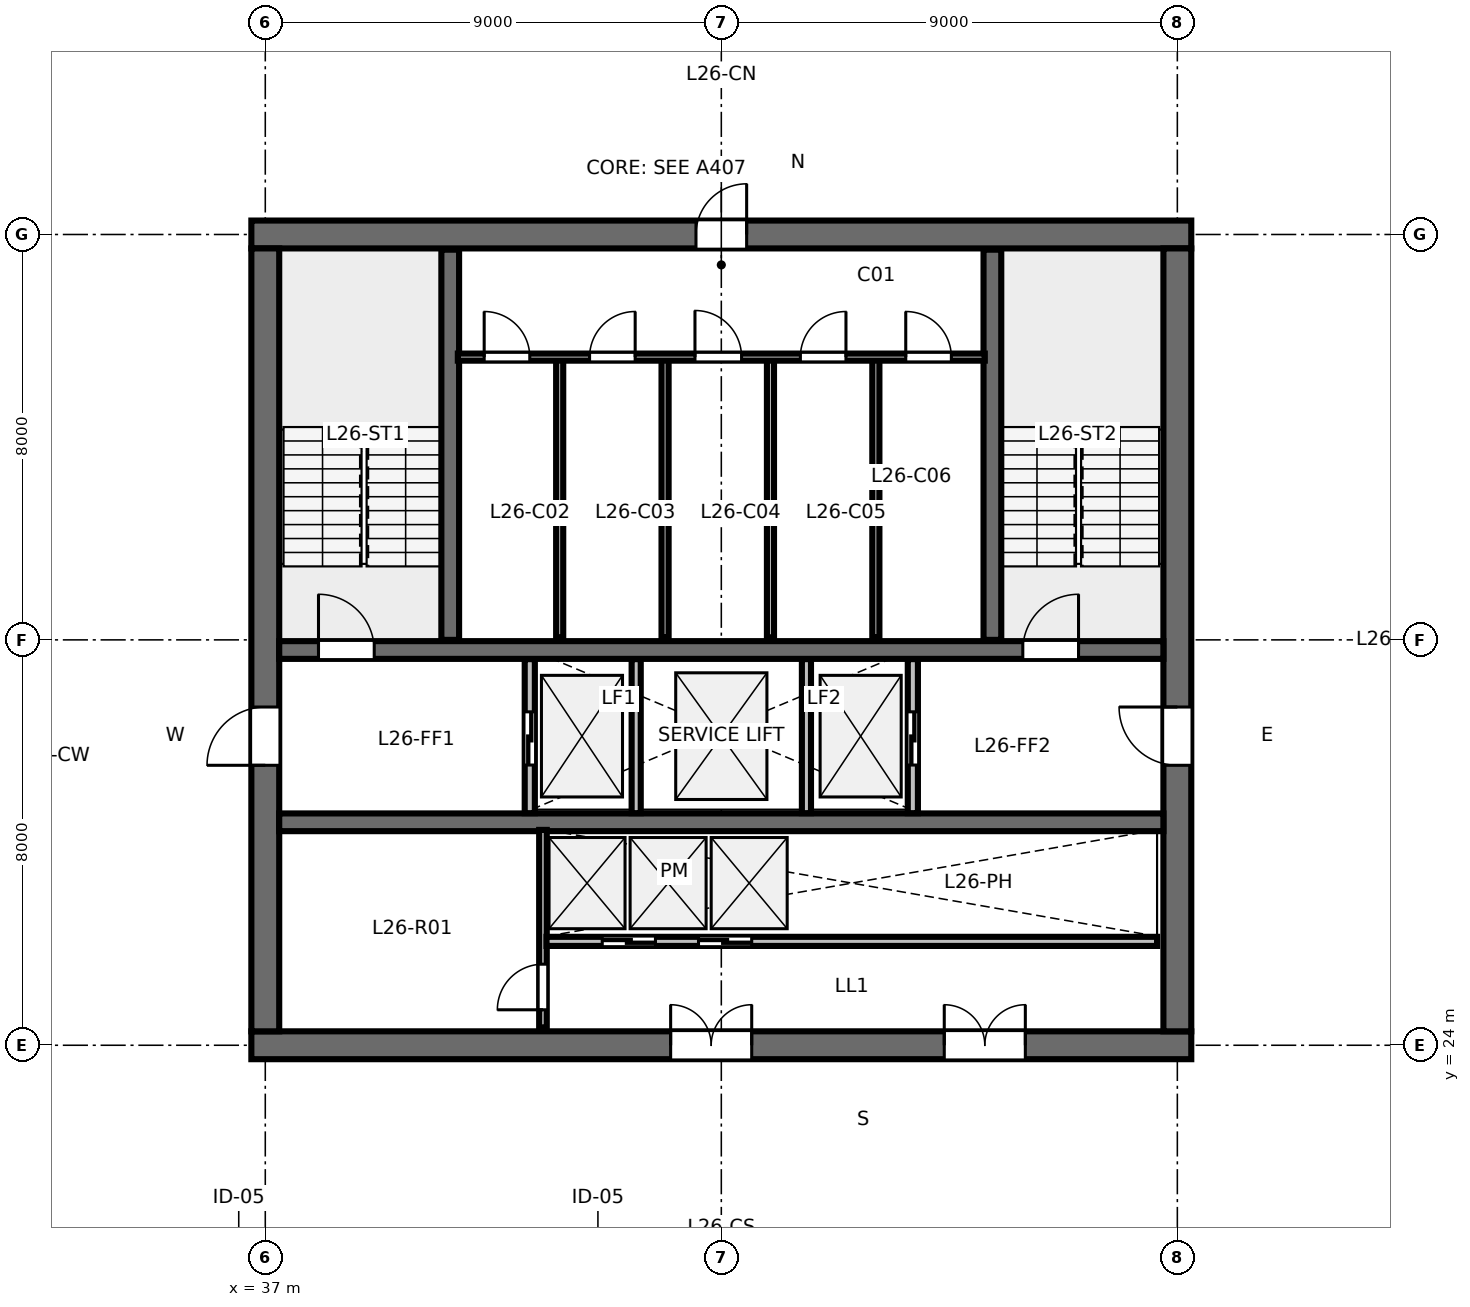
"""IFC4 building model, lengths in metres.
Left out: names, types, materials, properties, quantities, classifications, styles, units other than length and angle.
Written with IfcOpenShell. Run it as: python <this file> out.ifc"""

import sys

from ifc_helpers import new_model, si_unit, direction, frame, frame_2d, origin, place, context, subcontext, project, spatial, rectangle, extrude, element, fill, save


model = new_model("IFC4")
c1 = context("Model", 3, precision=1e-05, world=origin(), true_north=direction((0.0, 1.0)))
c2 = subcontext(c1, "Body", "Model", "MODEL_VIEW")
j1 = project(units=[si_unit("LENGTHUNIT", "METRE"), si_unit("PLANEANGLEUNIT", "RADIAN")], contexts=[c1])
p1 = place(None, origin())
s1 = spatial("IfcSite", under=j1, at=p1, CompositionType="ELEMENT")
p2 = place(p1, origin())
s2 = spatial("IfcBuilding", under=s1, at=p2, CompositionType="ELEMENT")
p3 = place(p2, frame((0.0, 0.0, 102.4)))
s3 = spatial("IfcBuildingStorey", under=s2, at=p3, CompositionType="ELEMENT", Elevation=102.4)
p4 = place(p3, frame((36.725, 24.0, 0.0), z_axis=(0.0, 0.0, 1.0), x_axis=(1.0, 0.0, 0.0)))
e1 = element("IfcWall", 1, at=p4, inside=s3, PredefinedType="SHEAR", context=c2, shape_type="SweptSolid", body=[
    extrude(rectangle(XDim=18.55, YDim=0.55, at=frame_2d((9.275, 0.0))), origin(), (0.0, 0.0, 1.0), 3.36),
])
p5 = place(p4, frame((8.275, 0.0, 0.0)))
e2 = element("IfcOpeningElement", 2, at=p5, cuts=e1, PredefinedType="OPENING", context=c2, shape_type="SweptSolid", body=[
    extrude(rectangle(XDim=1.6, YDim=2.15, at=frame_2d((0.8, 1.075))), frame((0.0, 0.285, 0.0), z_axis=(0.0, -1.0, 0.0), x_axis=(1.0, 0.0, 0.0)), (0.0, 0.0, 1.0), 0.57),
])
p6 = place(p4, frame((13.675, 0.0, 0.0)))
e3 = element("IfcOpeningElement", 3, at=p6, cuts=e1, PredefinedType="OPENING", context=c2, shape_type="SweptSolid", body=[
    extrude(rectangle(XDim=1.6, YDim=2.15, at=frame_2d((0.8, 1.075))), frame((0.0, 0.285, 0.0), z_axis=(0.0, -1.0, 0.0), x_axis=(1.0, 0.0, 0.0)), (0.0, 0.0, 1.0), 0.57),
])
p7 = place(p3, frame((36.725, 40.0, 0.0), z_axis=(0.0, 0.0, 1.0), x_axis=(1.0, 0.0, 0.0)))
e4 = element("IfcWall", 4, at=p7, inside=s3, PredefinedType="SHEAR", context=c2, shape_type="SweptSolid", body=[
    extrude(rectangle(XDim=18.55, YDim=0.55, at=frame_2d((9.275, 0.0))), origin(), (0.0, 0.0, 1.0), 3.36),
])
p8 = place(p7, frame((8.775, 0.0, 0.0)))
e5 = element("IfcOpeningElement", 5, at=p8, cuts=e4, PredefinedType="OPENING", context=c2, shape_type="SweptSolid", body=[
    extrude(rectangle(XDim=1.0, YDim=2.15, at=frame_2d((0.5, 1.075))), frame((0.0, 0.285, 0.0), z_axis=(0.0, -1.0, 0.0), x_axis=(1.0, 0.0, 0.0)), (0.0, 0.0, 1.0), 0.57),
])
p9 = place(p3, frame((37.0, 24.275, 0.0), z_axis=(0.0, 0.0, 1.0), x_axis=(0.0, 1.0, 0.0)))
e6 = element("IfcWall", 6, at=p9, inside=s3, PredefinedType="SHEAR", context=c2, shape_type="SweptSolid", body=[
    extrude(rectangle(XDim=15.45, YDim=0.55, at=frame_2d((7.725, 0.0))), origin(), (0.0, 0.0, 1.0), 3.36),
])
p10 = place(p9, frame((5.25, 0.0, 0.0)))
e7 = element("IfcOpeningElement", 7, at=p10, cuts=e6, PredefinedType="OPENING", context=c2, shape_type="SweptSolid", body=[
    extrude(rectangle(XDim=1.15, YDim=2.15, at=frame_2d((0.575, 1.075))), frame((0.0, 0.285, 0.0), z_axis=(0.0, -1.0, 0.0), x_axis=(1.0, 0.0, 0.0)), (0.0, 0.0, 1.0), 0.57),
])
p11 = place(p3, frame((55.0, 24.275, 0.0), z_axis=(0.0, 0.0, 1.0), x_axis=(0.0, 1.0, 0.0)))
e8 = element("IfcWall", 8, at=p11, inside=s3, PredefinedType="SHEAR", context=c2, shape_type="SweptSolid", body=[
    extrude(rectangle(XDim=15.45, YDim=0.55, at=frame_2d((7.725, 0.0))), origin(), (0.0, 0.0, 1.0), 3.36),
])
p12 = place(p11, frame((5.25, 0.0, 0.0)))
e9 = element("IfcOpeningElement", 9, at=p12, cuts=e8, PredefinedType="OPENING", context=c2, shape_type="SweptSolid", body=[
    extrude(rectangle(XDim=1.15, YDim=2.15, at=frame_2d((0.575, 1.075))), frame((0.0, 0.285, 0.0), z_axis=(0.0, -1.0, 0.0), x_axis=(1.0, 0.0, 0.0)), (0.0, 0.0, 1.0), 0.57),
])
p13 = place(p3, frame((37.275, 31.8, 0.0), z_axis=(0.0, 0.0, 1.0), x_axis=(1.0, 0.0, 0.0)))
e10 = element("IfcWall", 10, at=p13, inside=s3, PredefinedType="SHEAR", context=c2, shape_type="SweptSolid", body=[
    extrude(rectangle(XDim=17.45, YDim=0.35, at=frame_2d((8.725, 0.0))), origin(), (0.0, 0.0, 1.0), 3.36),
])
p14 = place(p13, frame((0.775, 0.0, 0.0)))
e11 = element("IfcOpeningElement", 11, at=p14, cuts=e10, PredefinedType="OPENING", context=c2, shape_type="SweptSolid", body=[
    extrude(rectangle(XDim=1.1, YDim=2.15, at=frame_2d((0.55, 1.075))), frame((0.0, 0.185, 0.0), z_axis=(0.0, -1.0, 0.0), x_axis=(1.0, 0.0, 0.0)), (0.0, 0.0, 1.0), 0.37),
])
p15 = place(p13, frame((14.675, 0.0, 0.0)))
e12 = element("IfcOpeningElement", 12, at=p15, cuts=e10, PredefinedType="OPENING", context=c2, shape_type="SweptSolid", body=[
    extrude(rectangle(XDim=1.1, YDim=2.15, at=frame_2d((0.55, 1.075))), frame((0.0, 0.185, 0.0), z_axis=(0.0, -1.0, 0.0), x_axis=(1.0, 0.0, 0.0)), (0.0, 0.0, 1.0), 0.37),
])
p16 = place(p3, frame((37.275, 28.4, 0.0), z_axis=(0.0, 0.0, 1.0), x_axis=(1.0, 0.0, 0.0)))
e13 = element("IfcWall", 13, at=p16, inside=s3, PredefinedType="SHEAR", context=c2, shape_type="SweptSolid", body=[
    extrude(rectangle(XDim=17.45, YDim=0.35, at=frame_2d((8.725, 0.0))), origin(), (0.0, 0.0, 1.0), 3.36),
])
for number, where, z_axis, x_axis in (
    (14, (40.65, 32.0, 0.0), (0.0, 0.0, 1.0), (0.0, 1.0, 0.0)),
    (15, (51.35, 32.0, 0.0), (0.0, 0.0, 1.0), (0.0, 1.0, 0.0)),
):
    element("IfcWall", number, at=place(p3, frame(where, z_axis=z_axis, x_axis=x_axis)), inside=s3, PredefinedType="SHEAR", context=c2, shape_type="SweptSolid", body=[
        extrude(rectangle(XDim=7.7, YDim=0.35, at=frame_2d((3.85, 0.0))), origin(), (0.0, 0.0, 1.0), 3.6),
    ])
for number, where, z_axis, x_axis in (
    (16, (42.81, 32.05, 0.0), (0.0, 0.0, 1.0), (0.0, 1.0, 0.0)),
    (17, (44.89, 32.05, 0.0), (0.0, 0.0, 1.0), (0.0, 1.0, 0.0)),
    (18, (46.97, 32.05, 0.0), (0.0, 0.0, 1.0), (0.0, 1.0, 0.0)),
    (19, (49.05, 32.05, 0.0), (0.0, 0.0, 1.0), (0.0, 1.0, 0.0)),
):
    element("IfcWall", number, at=place(p3, frame(where, z_axis=z_axis, x_axis=x_axis)), inside=s3, PredefinedType="PARTITIONING", context=c2, shape_type="SweptSolid", body=[
        extrude(rectangle(XDim=5.5, YDim=0.14, at=frame_2d((2.75, 0.0))), origin(), (0.0, 0.0, 1.0), 3.36),
    ])
p17 = place(p3, frame((40.8, 37.58, 0.0), z_axis=(0.0, 0.0, 1.0), x_axis=(1.0, 0.0, 0.0)))
e20 = element("IfcWall", 20, at=p17, inside=s3, PredefinedType="PARTITIONING", context=c2, shape_type="SweptSolid", body=[
    extrude(rectangle(XDim=10.4, YDim=0.14, at=frame_2d((5.2, 0.0))), origin(), (0.0, 0.0, 1.0), 3.36),
])
p18 = place(p17, frame((0.52, 0.0, 0.0)))
e21 = element("IfcOpeningElement", 21, at=p18, cuts=e20, PredefinedType="OPENING", context=c2, shape_type="SweptSolid", body=[
    extrude(rectangle(XDim=0.9, YDim=2.15, at=frame_2d((0.45, 1.075))), frame((0.0, 0.08, 0.0), z_axis=(0.0, -1.0, 0.0), x_axis=(1.0, 0.0, 0.0)), (0.0, 0.0, 1.0), 0.16),
])
p19 = place(p17, frame((2.6, 0.0, 0.0)))
e22 = element("IfcOpeningElement", 22, at=p19, cuts=e20, PredefinedType="OPENING", context=c2, shape_type="SweptSolid", body=[
    extrude(rectangle(XDim=0.9, YDim=2.15, at=frame_2d((0.45, 1.075))), frame((0.0, 0.08, 0.0), z_axis=(0.0, -1.0, 0.0), x_axis=(1.0, 0.0, 0.0)), (0.0, 0.0, 1.0), 0.16),
])
p20 = place(p17, frame((4.68, 0.0, 0.0)))
e23 = element("IfcOpeningElement", 23, at=p20, cuts=e20, PredefinedType="OPENING", context=c2, shape_type="SweptSolid", body=[
    extrude(rectangle(XDim=0.92, YDim=2.15, at=frame_2d((0.46, 1.075))), frame((0.0, 0.08, 0.0), z_axis=(0.0, -1.0, 0.0), x_axis=(1.0, 0.0, 0.0)), (0.0, 0.0, 1.0), 0.16),
])
p21 = place(p17, frame((6.76, 0.0, 0.0)))
e24 = element("IfcOpeningElement", 24, at=p21, cuts=e20, PredefinedType="OPENING", context=c2, shape_type="SweptSolid", body=[
    extrude(rectangle(XDim=0.9, YDim=2.15, at=frame_2d((0.45, 1.075))), frame((0.0, 0.08, 0.0), z_axis=(0.0, -1.0, 0.0), x_axis=(1.0, 0.0, 0.0)), (0.0, 0.0, 1.0), 0.16),
])
p22 = place(p17, frame((8.84, 0.0, 0.0)))
e25 = element("IfcOpeningElement", 25, at=p22, cuts=e20, PredefinedType="OPENING", context=c2, shape_type="SweptSolid", body=[
    extrude(rectangle(XDim=0.9, YDim=2.15, at=frame_2d((0.45, 1.075))), frame((0.0, 0.08, 0.0), z_axis=(0.0, -1.0, 0.0), x_axis=(1.0, 0.0, 0.0)), (0.0, 0.0, 1.0), 0.16),
])
p23 = place(p3, frame((42.22, 28.58, 0.0), z_axis=(0.0, 0.0, 1.0), x_axis=(0.0, 1.0, 0.0)))
e26 = element("IfcWall", 26, at=p23, inside=s3, PredefinedType="PARTITIONING", context=c2, shape_type="SweptSolid", body=[
    extrude(rectangle(XDim=3.04, YDim=0.2, at=frame_2d((1.52, 0.0))), origin(), (0.0, 0.0, 1.0), 3.36),
])
p24 = place(p23, frame((0.95, 0.0, 0.0)))
e27 = element("IfcOpeningElement", 27, at=p24, cuts=e26, PredefinedType="OPENING", context=c2, shape_type="SweptSolid", body=[
    extrude(rectangle(XDim=1.05, YDim=2.15, at=frame_2d((0.525, 1.075))), frame((0.0, 0.11, 0.0), z_axis=(0.0, -1.0, 0.0), x_axis=(1.0, 0.0, 0.0)), (0.0, 0.0, 1.0), 0.22),
])
p25 = place(p3, frame((49.78, 28.58, 0.0), z_axis=(0.0, 0.0, 1.0), x_axis=(0.0, 1.0, 0.0)))
e28 = element("IfcWall", 28, at=p25, inside=s3, PredefinedType="PARTITIONING", context=c2, shape_type="SweptSolid", body=[
    extrude(rectangle(XDim=3.04, YDim=0.2, at=frame_2d((1.52, 0.0))), origin(), (0.0, 0.0, 1.0), 3.36),
])
p26 = place(p25, frame((0.95, 0.0, 0.0)))
e29 = element("IfcOpeningElement", 29, at=p26, cuts=e28, PredefinedType="OPENING", context=c2, shape_type="SweptSolid", body=[
    extrude(rectangle(XDim=1.05, YDim=2.15, at=frame_2d((0.525, 1.075))), frame((0.0, 0.11, 0.0), z_axis=(0.0, -1.0, 0.0), x_axis=(1.0, 0.0, 0.0)), (0.0, 0.0, 1.0), 0.22),
])
for number, where, z_axis, x_axis in (
    (30, (44.32, 28.58, 0.0), (0.0, 0.0, 1.0), (0.0, 1.0, 0.0)),
    (31, (47.68, 28.58, 0.0), (0.0, 0.0, 1.0), (0.0, 1.0, 0.0)),
):
    element("IfcWall", number, at=place(p3, frame(where, z_axis=z_axis, x_axis=x_axis)), inside=s3, PredefinedType="PARTITIONING", context=c2, shape_type="SweptSolid", body=[
        extrude(rectangle(XDim=3.04, YDim=0.18, at=frame_2d((1.52, 0.0))), origin(), (0.0, 0.0, 1.0), 3.36),
    ])
p27 = place(p3, frame((42.48, 24.35, 0.0), z_axis=(0.0, 0.0, 1.0), x_axis=(0.0, 1.0, 0.0)))
e32 = element("IfcWall", 32, at=p27, inside=s3, PredefinedType="PARTITIONING", context=c2, shape_type="SweptSolid", body=[
    extrude(rectangle(XDim=3.9, YDim=0.15, at=frame_2d((1.95, 0.0))), origin(), (0.0, 0.0, 1.0), 3.36),
])
p28 = place(p27, frame((0.35, 0.0, 0.0)))
e33 = element("IfcOpeningElement", 33, at=p28, cuts=e32, PredefinedType="OPENING", context=c2, shape_type="SweptSolid", body=[
    extrude(rectangle(XDim=0.9, YDim=2.15, at=frame_2d((0.45, 1.075))), frame((0.0, 0.085, 0.0), z_axis=(0.0, -1.0, 0.0), x_axis=(1.0, 0.0, 0.0)), (0.0, 0.0, 1.0), 0.17),
])
p29 = place(p3, frame((42.55, 26.05, 0.0), z_axis=(0.0, 0.0, 1.0), x_axis=(1.0, 0.0, 0.0)))
e34 = element("IfcWall", 34, at=p29, inside=s3, PredefinedType="PARTITIONING", context=c2, shape_type="SweptSolid", body=[
    extrude(rectangle(XDim=12.05, YDim=0.18, at=frame_2d((6.025, 0.0))), origin(), (0.0, 0.0, 1.0), 3.36),
])
p30 = place(p29, frame((1.1, 0.0, 0.0)))
e35 = element("IfcOpeningElement", 35, at=p30, cuts=e34, PredefinedType="OPENING", context=c2, shape_type="SweptSolid", body=[
    extrude(rectangle(XDim=1.05, YDim=2.15, at=frame_2d((0.525, 1.075))), frame((0.0, 0.1, 0.0), z_axis=(0.0, -1.0, 0.0), x_axis=(1.0, 0.0, 0.0)), (0.0, 0.0, 1.0), 0.2),
])
p31 = place(p29, frame((3.0, 0.0, 0.0)))
e36 = element("IfcOpeningElement", 36, at=p31, cuts=e34, PredefinedType="OPENING", context=c2, shape_type="SweptSolid", body=[
    extrude(rectangle(XDim=1.05, YDim=2.15, at=frame_2d((0.525, 1.075))), frame((0.0, 0.1, 0.0), z_axis=(0.0, -1.0, 0.0), x_axis=(1.0, 0.0, 0.0)), (0.0, 0.0, 1.0), 0.2),
])
p32 = place(p14, origin())
e37 = element("IfcDoor", 37, at=p32, inside=s3, OperationType="SINGLE_SWING_LEFT", PredefinedType="DOOR", context=c2, shape_type="SweptSolid", body=[
    extrude(rectangle(XDim=1.1, YDim=2.15, at=frame_2d((0.55, 1.075))), frame((0.0, 0.025, 0.0), z_axis=(0.0, -1.0, 0.0), x_axis=(1.0, 0.0, 0.0)), (0.0, 0.0, 1.0), 0.05),
])
fill(e11, e37)
p33 = place(p15, origin())
e38 = element("IfcDoor", 38, at=p33, inside=s3, OperationType="SINGLE_SWING_RIGHT", PredefinedType="DOOR", context=c2, shape_type="SweptSolid", body=[
    extrude(rectangle(XDim=1.1, YDim=2.15, at=frame_2d((0.55, 1.075))), frame((0.0, 0.025, 0.0), z_axis=(0.0, -1.0, 0.0), x_axis=(1.0, 0.0, 0.0)), (0.0, 0.0, 1.0), 0.05),
])
fill(e12, e38)
p34 = place(p8, origin())
e39 = element("IfcDoor", 39, at=p34, inside=s3, OperationType="SINGLE_SWING_RIGHT", PredefinedType="DOOR", context=c2, shape_type="SweptSolid", body=[
    extrude(rectangle(XDim=1.0, YDim=2.15, at=frame_2d((0.5, 1.075))), frame((0.0, 0.025, 0.0), z_axis=(0.0, -1.0, 0.0), x_axis=(1.0, 0.0, 0.0)), (0.0, 0.0, 1.0), 0.05),
])
fill(e5, e39)
p35 = place(p10, origin())
e40 = element("IfcDoor", 40, at=p35, inside=s3, OperationType="SINGLE_SWING_LEFT", PredefinedType="DOOR", context=c2, shape_type="SweptSolid", body=[
    extrude(rectangle(XDim=1.15, YDim=2.15, at=frame_2d((0.575, 1.075))), frame((0.0, 0.025, 0.0), z_axis=(0.0, -1.0, 0.0), x_axis=(1.0, 0.0, 0.0)), (0.0, 0.0, 1.0), 0.05),
])
fill(e7, e40)
p36 = place(p12, origin())
e41 = element("IfcDoor", 41, at=p36, inside=s3, OperationType="SINGLE_SWING_RIGHT", PredefinedType="DOOR", context=c2, shape_type="SweptSolid", body=[
    extrude(rectangle(XDim=1.15, YDim=2.15, at=frame_2d((0.575, 1.075))), frame((0.0, 0.025, 0.0), z_axis=(0.0, -1.0, 0.0), x_axis=(1.0, 0.0, 0.0)), (0.0, 0.0, 1.0), 0.05),
])
fill(e9, e41)
p37 = place(p5, origin())
e42 = element("IfcDoor", 42, at=p37, inside=s3, OperationType="DOUBLE_DOOR_SINGLE_SWING", PredefinedType="DOOR", context=c2, shape_type="SweptSolid", body=[
    extrude(rectangle(XDim=1.6, YDim=2.15, at=frame_2d((0.8, 1.075))), frame((0.0, 0.025, 0.0), z_axis=(0.0, -1.0, 0.0), x_axis=(1.0, 0.0, 0.0)), (0.0, 0.0, 1.0), 0.05),
])
fill(e2, e42)
p38 = place(p6, origin())
e43 = element("IfcDoor", 43, at=p38, inside=s3, OperationType="DOUBLE_DOOR_SINGLE_SWING", PredefinedType="DOOR", context=c2, shape_type="SweptSolid", body=[
    extrude(rectangle(XDim=1.6, YDim=2.15, at=frame_2d((0.8, 1.075))), frame((0.0, 0.025, 0.0), z_axis=(0.0, -1.0, 0.0), x_axis=(1.0, 0.0, 0.0)), (0.0, 0.0, 1.0), 0.05),
])
fill(e3, e43)
p39 = place(p18, origin())
e44 = element("IfcDoor", 44, at=p39, inside=s3, OperationType="SINGLE_SWING_LEFT", PredefinedType="DOOR", context=c2, shape_type="SweptSolid", body=[
    extrude(rectangle(XDim=0.9, YDim=2.15, at=frame_2d((0.45, 1.075))), frame((0.0, 0.025, 0.0), z_axis=(0.0, -1.0, 0.0), x_axis=(1.0, 0.0, 0.0)), (0.0, 0.0, 1.0), 0.05),
])
fill(e21, e44)
p40 = place(p19, origin())
e45 = element("IfcDoor", 45, at=p40, inside=s3, OperationType="SINGLE_SWING_RIGHT", PredefinedType="DOOR", context=c2, shape_type="SweptSolid", body=[
    extrude(rectangle(XDim=0.9, YDim=2.15, at=frame_2d((0.45, 1.075))), frame((0.0, 0.025, 0.0), z_axis=(0.0, -1.0, 0.0), x_axis=(1.0, 0.0, 0.0)), (0.0, 0.0, 1.0), 0.05),
])
fill(e22, e45)
p41 = place(p20, origin())
e46 = element("IfcDoor", 46, at=p41, inside=s3, OperationType="SINGLE_SWING_LEFT", PredefinedType="DOOR", context=c2, shape_type="SweptSolid", body=[
    extrude(rectangle(XDim=0.92, YDim=2.15, at=frame_2d((0.46, 1.075))), frame((0.0, 0.025, 0.0), z_axis=(0.0, -1.0, 0.0), x_axis=(1.0, 0.0, 0.0)), (0.0, 0.0, 1.0), 0.05),
])
fill(e23, e46)
p42 = place(p21, origin())
e47 = element("IfcDoor", 47, at=p42, inside=s3, OperationType="SINGLE_SWING_RIGHT", PredefinedType="DOOR", context=c2, shape_type="SweptSolid", body=[
    extrude(rectangle(XDim=0.9, YDim=2.15, at=frame_2d((0.45, 1.075))), frame((0.0, 0.025, 0.0), z_axis=(0.0, -1.0, 0.0), x_axis=(1.0, 0.0, 0.0)), (0.0, 0.0, 1.0), 0.05),
])
fill(e24, e47)
p43 = place(p22, origin())
e48 = element("IfcDoor", 48, at=p43, inside=s3, OperationType="SINGLE_SWING_LEFT", PredefinedType="DOOR", context=c2, shape_type="SweptSolid", body=[
    extrude(rectangle(XDim=0.9, YDim=2.15, at=frame_2d((0.45, 1.075))), frame((0.0, 0.025, 0.0), z_axis=(0.0, -1.0, 0.0), x_axis=(1.0, 0.0, 0.0)), (0.0, 0.0, 1.0), 0.05),
])
fill(e25, e48)
p44 = place(p24, origin())
e49 = element("IfcDoor", 49, at=p44, inside=s3, OperationType="SLIDING_TO_LEFT", PredefinedType="DOOR", context=c2, shape_type="SweptSolid", body=[
    extrude(rectangle(XDim=1.05, YDim=2.15, at=frame_2d((0.525, 1.075))), frame((0.0, 0.025, 0.0), z_axis=(0.0, -1.0, 0.0), x_axis=(1.0, 0.0, 0.0)), (0.0, 0.0, 1.0), 0.05),
])
fill(e27, e49)
p45 = place(p26, origin())
e50 = element("IfcDoor", 50, at=p45, inside=s3, OperationType="SLIDING_TO_RIGHT", PredefinedType="DOOR", context=c2, shape_type="SweptSolid", body=[
    extrude(rectangle(XDim=1.05, YDim=2.15, at=frame_2d((0.525, 1.075))), frame((0.0, 0.025, 0.0), z_axis=(0.0, -1.0, 0.0), x_axis=(1.0, 0.0, 0.0)), (0.0, 0.0, 1.0), 0.05),
])
fill(e29, e50)
p46 = place(p28, origin())
e51 = element("IfcDoor", 51, at=p46, inside=s3, OperationType="SINGLE_SWING_LEFT", PredefinedType="DOOR", context=c2, shape_type="SweptSolid", body=[
    extrude(rectangle(XDim=0.9, YDim=2.15, at=frame_2d((0.45, 1.075))), frame((0.0, 0.025, 0.0), z_axis=(0.0, -1.0, 0.0), x_axis=(1.0, 0.0, 0.0)), (0.0, 0.0, 1.0), 0.05),
])
fill(e33, e51)
p47 = place(p30, origin())
e52 = element("IfcDoor", 52, at=p47, inside=s3, OperationType="SLIDING_TO_LEFT", PredefinedType="DOOR", context=c2, shape_type="SweptSolid", body=[
    extrude(rectangle(XDim=1.05, YDim=2.15, at=frame_2d((0.525, 1.075))), frame((0.0, 0.025, 0.0), z_axis=(0.0, -1.0, 0.0), x_axis=(1.0, 0.0, 0.0)), (0.0, 0.0, 1.0), 0.05),
])
fill(e35, e52)
p48 = place(p31, origin())
e53 = element("IfcDoor", 53, at=p48, inside=s3, OperationType="SLIDING_TO_RIGHT", PredefinedType="DOOR", context=c2, shape_type="SweptSolid", body=[
    extrude(rectangle(XDim=1.05, YDim=2.15, at=frame_2d((0.525, 1.075))), frame((0.0, 0.025, 0.0), z_axis=(0.0, -1.0, 0.0), x_axis=(1.0, 0.0, 0.0)), (0.0, 0.0, 1.0), 0.05),
])
fill(e36, e53)
save(model, sys.argv[1])
